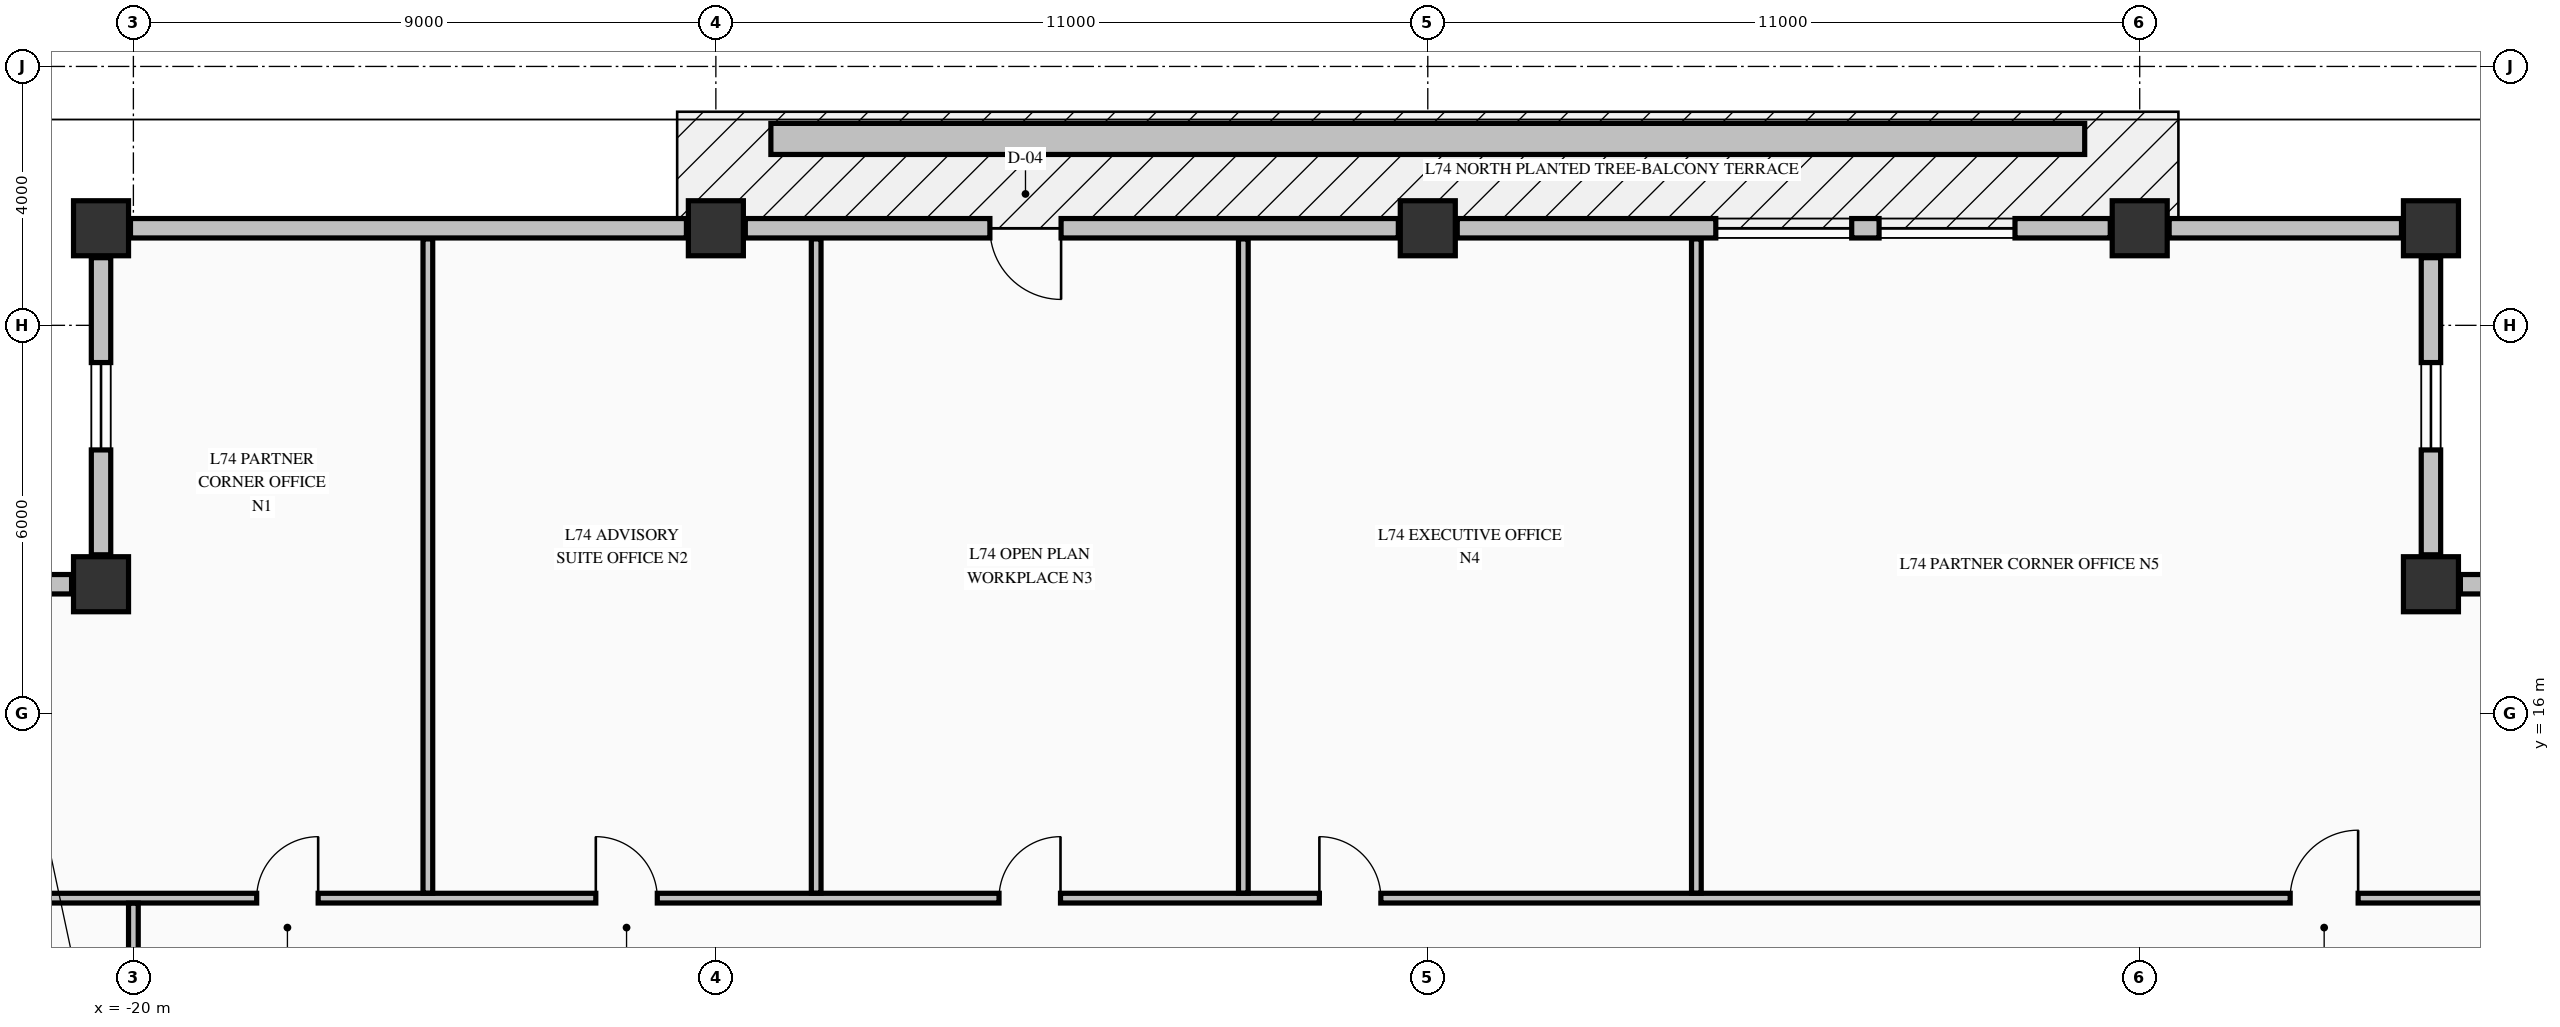
"""IFC4 building model, lengths in metres.
Left out: names, types, materials, properties, quantities, classifications, styles, units other than length and angle.
Written with IfcOpenShell. Run it as: python <this file> out.ifc"""

import sys

from ifc_helpers import new_model, si_unit, direction, frame, frame_2d, origin, origin_2d, place, context, subcontext, project, spatial, rectangle, extrude, element, fill, save


model = new_model("IFC4")
c1 = context("Model", 3, precision=1e-05, world=origin(), true_north=direction((0.0, 1.0)))
c2 = subcontext(c1, "Body", "Model", "MODEL_VIEW")
j1 = project(units=[si_unit("LENGTHUNIT", "METRE"), si_unit("PLANEANGLEUNIT", "RADIAN")], contexts=[c1])
p1 = place(None, origin())
s1 = spatial("IfcSite", under=j1, at=p1, CompositionType="ELEMENT")
p2 = place(p1, origin())
s2 = spatial("IfcBuilding", under=s1, at=p2, CompositionType="ELEMENT")
p3 = place(p2, frame((0.0, 0.0, 278.06)))
s3 = spatial("IfcBuildingStorey", under=s2, at=p3, CompositionType="ELEMENT", Elevation=278.06)
for number, where, z_axis, x_axis in (
    (1, (-20.5, 23.5, -0.425), (0.0, 0.0, 1.0), (1.0, 0.0, 0.0)),
    (2, (-11.0, 23.5, -0.425), (0.0, 0.0, 1.0), (1.0, 0.0, 0.0)),
    (3, (0.0, 23.5, -0.425), (0.0, 0.0, 1.0), (1.0, 0.0, 0.0)),
    (4, (11.0, 23.5, -0.425), (0.0, 0.0, 1.0), (1.0, 0.0, 0.0)),
    (5, (15.5, 23.5, -0.425), (0.0, 0.0, 1.0), (1.0, 0.0, 0.0)),
    (6, (15.5, 18.0, -0.425), (0.0, 0.0, 1.0), (1.0, 0.0, 0.0)),
    (7, (-20.5, 18.0, -0.425), (0.0, 0.0, 1.0), (1.0, 0.0, 0.0)),
):
    element("IfcColumn", number, at=place(p3, frame(where, z_axis=z_axis, x_axis=x_axis)), inside=s3, PredefinedType="COLUMN", context=c2, shape_type="SweptSolid", body=[
        extrude(rectangle(XDim=0.85, YDim=0.85, at=origin_2d()), origin(), (0.0, 0.0, 1.0), 3.84),
    ])
p4 = place(p3, frame((20.545, 18.0, 0.0), z_axis=(0.0, 0.0, 1.0), x_axis=(-1.0, 0.0, 0.0)))
e8 = element("IfcWall", 8, at=p4, inside=s3, PredefinedType="STANDARD", context=c2, shape_type="SweptSolid", body=[
    extrude(rectangle(XDim=4.59, YDim=0.3, at=frame_2d((2.295, 0.0))), origin(), (0.0, 0.0, 1.0), 2.807),
])
p5 = place(p4, frame((1.62, 0.0, 0.68)))
e9 = element("IfcOpeningElement", 9, at=p5, cuts=e8, PredefinedType="OPENING", context=c2, shape_type="SweptSolid", body=[
    extrude(rectangle(XDim=1.35, YDim=1.42, at=frame_2d((0.675, 0.71))), frame((0.0, 0.16, 0.0), z_axis=(0.0, -1.0, 0.0), x_axis=(1.0, 0.0, 0.0)), (0.0, 0.0, 1.0), 0.32),
])
p6 = place(p3, frame((15.5, 18.455, 0.0), z_axis=(0.0, 0.0, 1.0), x_axis=(0.0, 1.0, 0.0)))
e10 = element("IfcWall", 10, at=p6, inside=s3, PredefinedType="STANDARD", context=c2, shape_type="SweptSolid", body=[
    extrude(rectangle(XDim=4.59, YDim=0.3, at=frame_2d((2.295, 0.0))), origin(), (0.0, 0.0, 1.0), 2.807),
])
p7 = place(p6, frame((1.62, 0.0, 0.68)))
e11 = element("IfcOpeningElement", 11, at=p7, cuts=e10, PredefinedType="OPENING", context=c2, shape_type="SweptSolid", body=[
    extrude(rectangle(XDim=1.35, YDim=1.42, at=frame_2d((0.675, 0.71))), frame((0.0, 0.16, 0.0), z_axis=(0.0, -1.0, 0.0), x_axis=(1.0, 0.0, 0.0)), (0.0, 0.0, 1.0), 0.32),
])
p8 = place(p3, frame((-20.5, 23.045, 0.0), z_axis=(0.0, 0.0, 1.0), x_axis=(0.0, -1.0, 0.0)))
e12 = element("IfcWall", 12, at=p8, inside=s3, PredefinedType="STANDARD", context=c2, shape_type="SweptSolid", body=[
    extrude(rectangle(XDim=4.59, YDim=0.3, at=frame_2d((2.295, 0.0))), origin(), (0.0, 0.0, 1.0), 2.807),
])
p9 = place(p8, frame((1.62, 0.0, 0.68)))
e13 = element("IfcOpeningElement", 13, at=p9, cuts=e12, PredefinedType="OPENING", context=c2, shape_type="SweptSolid", body=[
    extrude(rectangle(XDim=1.35, YDim=1.42, at=frame_2d((0.675, 0.71))), frame((0.0, 0.16, 0.0), z_axis=(0.0, -1.0, 0.0), x_axis=(1.0, 0.0, 0.0)), (0.0, 0.0, 1.0), 0.32),
])
p10 = place(p3, frame((-20.955, 18.0, 0.0), z_axis=(0.0, 0.0, 1.0), x_axis=(-1.0, 0.0, 0.0)))
e14 = element("IfcWall", 14, at=p10, inside=s3, PredefinedType="STANDARD", context=c2, shape_type="SweptSolid", body=[
    extrude(rectangle(XDim=4.59, YDim=0.3, at=frame_2d((2.295, 0.0))), origin(), (0.0, 0.0, 1.0), 2.807),
])
p11 = place(p10, frame((1.62, 0.0, 0.68)))
e15 = element("IfcOpeningElement", 15, at=p11, cuts=e14, PredefinedType="OPENING", context=c2, shape_type="SweptSolid", body=[
    extrude(rectangle(XDim=1.35, YDim=1.42, at=frame_2d((0.675, 0.71))), frame((0.0, 0.16, 0.0), z_axis=(0.0, -1.0, 0.0), x_axis=(1.0, 0.0, 0.0)), (0.0, 0.0, 1.0), 0.32),
])
p12 = place(p3, frame((-11.455, 23.5, 0.0), z_axis=(0.0, 0.0, 1.0), x_axis=(-1.0, 0.0, 0.0)))
e16 = element("IfcWall", 16, at=p12, inside=s3, PredefinedType="STANDARD", context=c2, shape_type="SweptSolid", body=[
    extrude(rectangle(XDim=8.59, YDim=0.3, at=frame_2d((4.295, 0.0))), origin(), (0.0, 0.0, 1.0), 2.807),
])
p13 = place(p3, frame((-0.455, 23.5, 0.0), z_axis=(0.0, 0.0, 1.0), x_axis=(-1.0, 0.0, 0.0)))
e17 = element("IfcWall", 17, at=p13, inside=s3, PredefinedType="STANDARD", context=c2, shape_type="SweptSolid", body=[
    extrude(rectangle(XDim=10.09, YDim=0.3, at=frame_2d((5.045, 0.0))), origin(), (0.0, 0.0, 1.0), 2.807),
])
p14 = place(p13, frame((5.211, 0.0, 0.0)))
e18 = element("IfcOpeningElement", 18, at=p14, cuts=e17, PredefinedType="OPENING", context=c2, shape_type="SweptSolid", body=[
    extrude(rectangle(XDim=1.1, YDim=2.15, at=frame_2d((0.55, 1.075))), frame((0.0, 0.16, 0.0), z_axis=(0.0, -1.0, 0.0), x_axis=(1.0, 0.0, 0.0)), (0.0, 0.0, 1.0), 0.32),
])
p15 = place(p3, frame((10.545, 23.5, 0.0), z_axis=(0.0, 0.0, 1.0), x_axis=(-1.0, 0.0, 0.0)))
e19 = element("IfcWall", 19, at=p15, inside=s3, PredefinedType="STANDARD", context=c2, shape_type="SweptSolid", body=[
    extrude(rectangle(XDim=10.09, YDim=0.3, at=frame_2d((5.045, 0.0))), origin(), (0.0, 0.0, 1.0), 2.807),
])
p16 = place(p15, frame((1.472, 0.0, 0.7)))
e20 = element("IfcOpeningElement", 20, at=p16, cuts=e19, PredefinedType="OPENING", context=c2, shape_type="SweptSolid", body=[
    extrude(rectangle(XDim=2.1, YDim=1.5, at=frame_2d((1.05, 0.75))), frame((0.0, 0.16, 0.0), z_axis=(0.0, -1.0, 0.0), x_axis=(1.0, 0.0, 0.0)), (0.0, 0.0, 1.0), 0.32),
])
p17 = place(p15, frame((3.995, 0.0, 0.7)))
e21 = element("IfcOpeningElement", 21, at=p17, cuts=e19, PredefinedType="OPENING", context=c2, shape_type="SweptSolid", body=[
    extrude(rectangle(XDim=2.1, YDim=1.5, at=frame_2d((1.05, 0.75))), frame((0.0, 0.16, 0.0), z_axis=(0.0, -1.0, 0.0), x_axis=(1.0, 0.0, 0.0)), (0.0, 0.0, 1.0), 0.32),
])
p18 = place(p3, frame((15.045, 23.5, 0.0), z_axis=(0.0, 0.0, 1.0), x_axis=(-1.0, 0.0, 0.0)))
e22 = element("IfcWall", 22, at=p18, inside=s3, PredefinedType="STANDARD", context=c2, shape_type="SweptSolid", body=[
    extrude(rectangle(XDim=3.59, YDim=0.3, at=frame_2d((1.795, 0.0))), origin(), (0.0, 0.0, 1.0), 2.807),
])
p19 = place(p3, frame((-25.835, 13.15, 0.0), z_axis=(0.0, 0.0, 1.0), x_axis=(1.0, 0.0, 0.0)))
e23 = element("IfcWall", 23, at=p19, inside=s3, PredefinedType="PARTITIONING", context=c2, shape_type="SweptSolid", body=[
    extrude(rectangle(XDim=45.91, YDim=0.15, at=frame_2d((22.955, 0.0))), origin(), (0.0, 0.0, 1.0), 3.415),
])
p20 = place(p19, frame((7.74, 0.0, 0.0)))
e24 = element("IfcOpeningElement", 24, at=p20, cuts=e23, PredefinedType="OPENING", context=c2, shape_type="SweptSolid", body=[
    extrude(rectangle(XDim=0.95, YDim=2.15, at=frame_2d((0.475, 1.075))), frame((0.0, 0.085, 0.0), z_axis=(0.0, -1.0, 0.0), x_axis=(1.0, 0.0, 0.0)), (0.0, 0.0, 1.0), 0.17),
])
p21 = place(p19, frame((12.98, 0.0, 0.0)))
e25 = element("IfcOpeningElement", 25, at=p21, cuts=e23, PredefinedType="OPENING", context=c2, shape_type="SweptSolid", body=[
    extrude(rectangle(XDim=0.95, YDim=2.15, at=frame_2d((0.475, 1.075))), frame((0.0, 0.085, 0.0), z_axis=(0.0, -1.0, 0.0), x_axis=(1.0, 0.0, 0.0)), (0.0, 0.0, 1.0), 0.17),
])
p22 = place(p19, frame((19.21, 0.0, 0.0)))
e26 = element("IfcOpeningElement", 26, at=p22, cuts=e23, PredefinedType="OPENING", context=c2, shape_type="SweptSolid", body=[
    extrude(rectangle(XDim=0.95, YDim=2.15, at=frame_2d((0.475, 1.075))), frame((0.0, 0.085, 0.0), z_axis=(0.0, -1.0, 0.0), x_axis=(1.0, 0.0, 0.0)), (0.0, 0.0, 1.0), 0.17),
])
p23 = place(p19, frame((24.16, 0.0, 0.0)))
e27 = element("IfcOpeningElement", 27, at=p23, cuts=e23, PredefinedType="OPENING", context=c2, shape_type="SweptSolid", body=[
    extrude(rectangle(XDim=0.95, YDim=2.15, at=frame_2d((0.475, 1.075))), frame((0.0, 0.085, 0.0), z_axis=(0.0, -1.0, 0.0), x_axis=(1.0, 0.0, 0.0)), (0.0, 0.0, 1.0), 0.17),
])
p24 = place(p19, frame((39.16, 0.0, 0.0)))
e28 = element("IfcOpeningElement", 28, at=p24, cuts=e23, PredefinedType="OPENING", context=c2, shape_type="SweptSolid", body=[
    extrude(rectangle(XDim=1.05, YDim=2.15, at=frame_2d((0.525, 1.075))), frame((0.0, 0.085, 0.0), z_axis=(0.0, -1.0, 0.0), x_axis=(1.0, 0.0, 0.0)), (0.0, 0.0, 1.0), 0.17),
])
p25 = place(p3, frame((-20.0, 11.006, 0.0), z_axis=(0.0, 0.0, 1.0), x_axis=(0.0, 1.0, 0.0)))
e29 = element("IfcWall", 29, at=p25, inside=s3, PredefinedType="PARTITIONING", context=c2, shape_type="SweptSolid", body=[
    extrude(rectangle(XDim=2.066, YDim=0.15, at=frame_2d((1.033, 0.0))), origin(), (0.0, 0.0, 1.0), 3.415),
])
p26 = place(p25, frame((0.339, 0.0, 0.0)))
e30 = element("IfcOpeningElement", 30, at=p26, cuts=e29, PredefinedType="OPENING", context=c2, shape_type="SweptSolid", body=[
    extrude(rectangle(XDim=0.95, YDim=2.15, at=frame_2d((0.475, 1.075))), frame((0.0, 0.085, 0.0), z_axis=(0.0, -1.0, 0.0), x_axis=(1.0, 0.0, 0.0)), (0.0, 0.0, 1.0), 0.17),
])
for number, where, z_axis, x_axis in (
    (31, (-15.45, 13.228, 0.0), (0.0, 0.0, 1.0), (0.0, 1.0, 0.0)),
    (32, (-9.45, 13.228, 0.0), (0.0, 0.0, 1.0), (0.0, 1.0, 0.0)),
    (33, (-2.85, 13.228, 0.0), (0.0, 0.0, 1.0), (0.0, 1.0, 0.0)),
    (34, (4.15, 13.228, 0.0), (0.0, 0.0, 1.0), (0.0, 1.0, 0.0)),
):
    element("IfcWall", number, at=place(p3, frame(where, z_axis=z_axis, x_axis=x_axis)), inside=s3, PredefinedType="PARTITIONING", context=c2, shape_type="SweptSolid", body=[
        extrude(rectangle(XDim=10.107, YDim=0.15, at=frame_2d((5.053, 0.0))), origin(), (0.0, 0.0, 1.0), 3.415),
    ])
p27 = place(p3, frame((-10.15, 24.88, -0.04), z_axis=(0.0, 0.0, 1.0), x_axis=(1.0, 0.0, 0.0)))
e35 = element("IfcWall", 35, at=p27, inside=s3, PredefinedType="PARAPET", context=c2, shape_type="SweptSolid", body=[
    extrude(rectangle(XDim=20.3, YDim=0.48, at=frame_2d((10.15, 0.0))), origin(), (0.0, 0.0, 1.0), 0.52),
])
p28 = place(p7, origin())
e36 = element("IfcWindow", 36, at=p28, inside=s3, PartitioningType="SINGLE_PANEL", PredefinedType="WINDOW", context=c2, shape_type="SweptSolid", body=[
    extrude(rectangle(XDim=1.35, YDim=1.42, at=frame_2d((0.675, 0.71))), frame((0.0, 0.03, 0.0), z_axis=(0.0, -1.0, 0.0), x_axis=(1.0, 0.0, 0.0)), (0.0, 0.0, 1.0), 0.06),
])
fill(e11, e36)
p29 = place(p9, origin())
e37 = element("IfcWindow", 37, at=p29, inside=s3, PartitioningType="SINGLE_PANEL", PredefinedType="WINDOW", context=c2, shape_type="SweptSolid", body=[
    extrude(rectangle(XDim=1.35, YDim=1.42, at=frame_2d((0.675, 0.71))), frame((0.0, 0.03, 0.0), z_axis=(0.0, -1.0, 0.0), x_axis=(1.0, 0.0, 0.0)), (0.0, 0.0, 1.0), 0.06),
])
fill(e13, e37)
p30 = place(p14, origin())
e38 = element("IfcDoor", 38, at=p30, inside=s3, OperationType="SINGLE_SWING_LEFT", PredefinedType="DOOR", context=c2, shape_type="SweptSolid", body=[
    extrude(rectangle(XDim=1.1, YDim=2.15, at=frame_2d((0.55, 1.075))), frame((0.0, 0.025, 0.0), z_axis=(0.0, -1.0, 0.0), x_axis=(1.0, 0.0, 0.0)), (0.0, 0.0, 1.0), 0.05),
])
fill(e18, e38)
p31 = place(p16, origin())
e39 = element("IfcWindow", 39, at=p31, inside=s3, PartitioningType="SINGLE_PANEL", PredefinedType="WINDOW", context=c2, shape_type="SweptSolid", body=[
    extrude(rectangle(XDim=2.1, YDim=1.5, at=frame_2d((1.05, 0.75))), frame((0.0, 0.03, 0.0), z_axis=(0.0, -1.0, 0.0), x_axis=(1.0, 0.0, 0.0)), (0.0, 0.0, 1.0), 0.06),
])
fill(e20, e39)
p32 = place(p17, origin())
e40 = element("IfcWindow", 40, at=p32, inside=s3, PartitioningType="SINGLE_PANEL", PredefinedType="WINDOW", context=c2, shape_type="SweptSolid", body=[
    extrude(rectangle(XDim=2.1, YDim=1.5, at=frame_2d((1.05, 0.75))), frame((0.0, 0.03, 0.0), z_axis=(0.0, -1.0, 0.0), x_axis=(1.0, 0.0, 0.0)), (0.0, 0.0, 1.0), 0.06),
])
fill(e21, e40)
p33 = place(p20, origin())
e41 = element("IfcDoor", 41, at=p33, inside=s3, OperationType="SINGLE_SWING_RIGHT", PredefinedType="DOOR", context=c2, shape_type="SweptSolid", body=[
    extrude(rectangle(XDim=0.95, YDim=2.15, at=frame_2d((0.475, 1.075))), frame((0.0, 0.025, 0.0), z_axis=(0.0, -1.0, 0.0), x_axis=(1.0, 0.0, 0.0)), (0.0, 0.0, 1.0), 0.05),
])
fill(e24, e41)
p34 = place(p21, origin())
e42 = element("IfcDoor", 42, at=p34, inside=s3, OperationType="SINGLE_SWING_LEFT", PredefinedType="DOOR", context=c2, shape_type="SweptSolid", body=[
    extrude(rectangle(XDim=0.95, YDim=2.15, at=frame_2d((0.475, 1.075))), frame((0.0, 0.025, 0.0), z_axis=(0.0, -1.0, 0.0), x_axis=(1.0, 0.0, 0.0)), (0.0, 0.0, 1.0), 0.05),
])
fill(e25, e42)
p35 = place(p22, origin())
e43 = element("IfcDoor", 43, at=p35, inside=s3, OperationType="SINGLE_SWING_RIGHT", PredefinedType="DOOR", context=c2, shape_type="SweptSolid", body=[
    extrude(rectangle(XDim=0.95, YDim=2.15, at=frame_2d((0.475, 1.075))), frame((0.0, 0.025, 0.0), z_axis=(0.0, -1.0, 0.0), x_axis=(1.0, 0.0, 0.0)), (0.0, 0.0, 1.0), 0.05),
])
fill(e26, e43)
p36 = place(p23, origin())
e44 = element("IfcDoor", 44, at=p36, inside=s3, OperationType="SINGLE_SWING_LEFT", PredefinedType="DOOR", context=c2, shape_type="SweptSolid", body=[
    extrude(rectangle(XDim=0.95, YDim=2.15, at=frame_2d((0.475, 1.075))), frame((0.0, 0.025, 0.0), z_axis=(0.0, -1.0, 0.0), x_axis=(1.0, 0.0, 0.0)), (0.0, 0.0, 1.0), 0.05),
])
fill(e27, e44)
p37 = place(p24, origin())
e45 = element("IfcDoor", 45, at=p37, inside=s3, OperationType="SINGLE_SWING_RIGHT", PredefinedType="DOOR", context=c2, shape_type="SweptSolid", body=[
    extrude(rectangle(XDim=1.05, YDim=2.15, at=frame_2d((0.525, 1.075))), frame((0.0, 0.025, 0.0), z_axis=(0.0, -1.0, 0.0), x_axis=(1.0, 0.0, 0.0)), (0.0, 0.0, 1.0), 0.05),
])
fill(e28, e45)
save(model, sys.argv[1])
